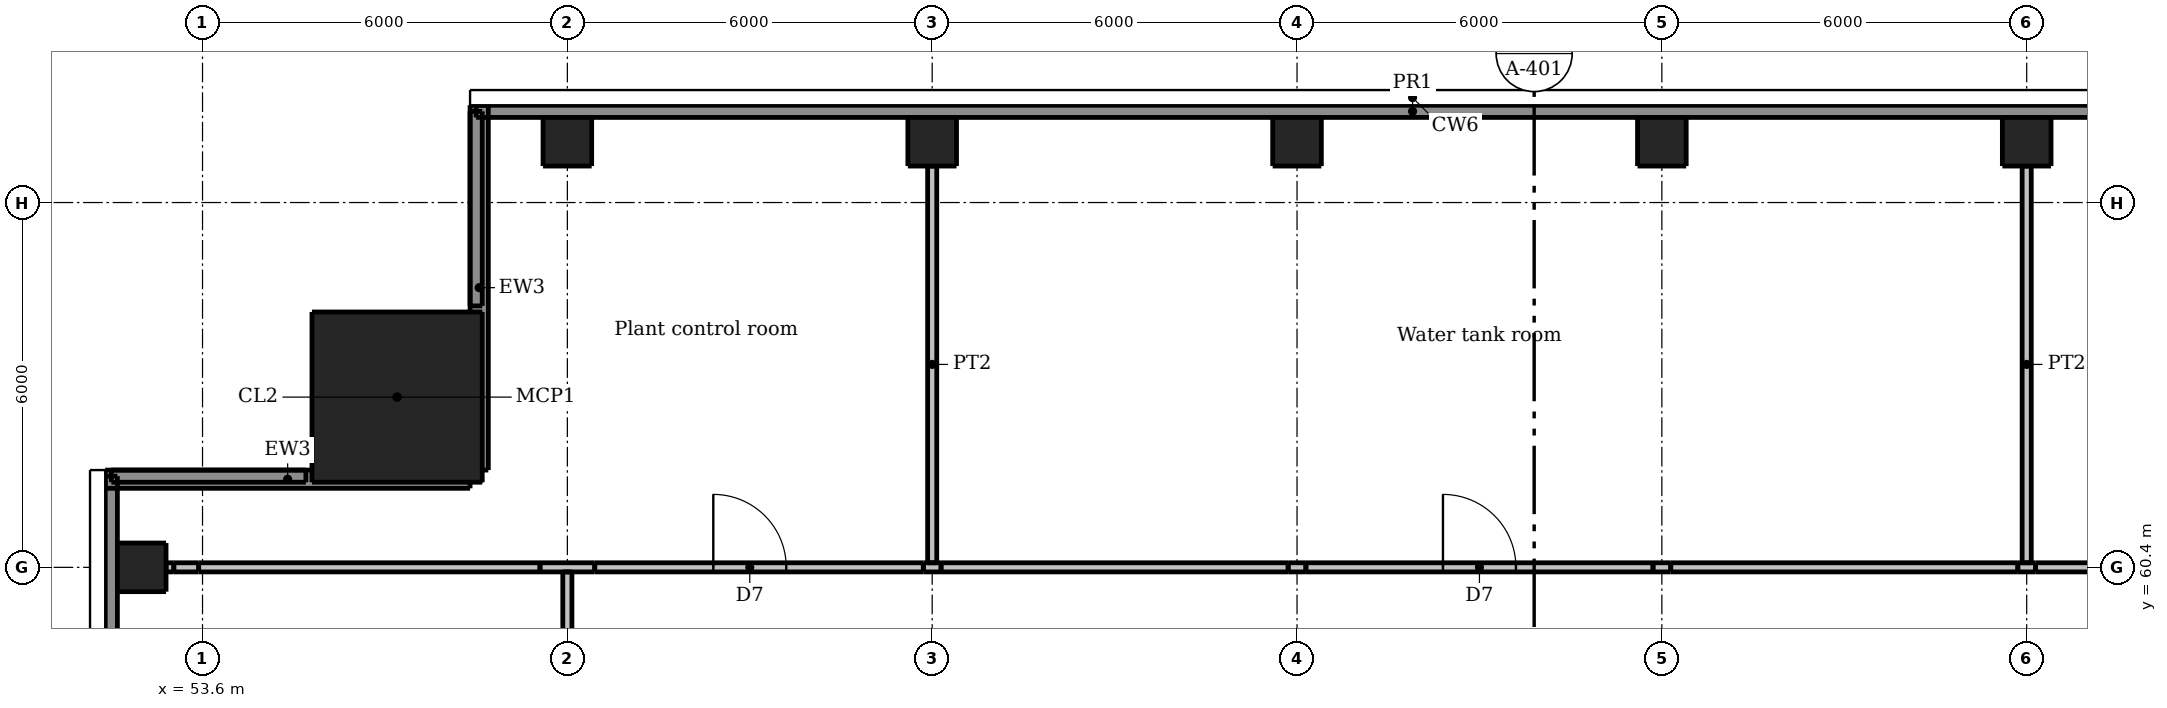
"""IFC4 building model, lengths in metres.
Left out: names, types, materials, properties, quantities, classifications, styles, units other than length and angle.
Written with IfcOpenShell. Run it as: python <this file> out.ifc"""

import sys

from ifc_helpers import new_model, si_unit, direction, frame, frame_2d, origin, origin_2d, place, context, subcontext, project, spatial, rectangle, extrude, element, fill, save


model = new_model("IFC4")
c1 = context("Model", 3, precision=1e-05, world=origin(), true_north=direction((0.0, 1.0)))
c2 = subcontext(c1, "Body", "Model", "MODEL_VIEW")
j1 = project(units=[si_unit("LENGTHUNIT", "METRE"), si_unit("PLANEANGLEUNIT", "RADIAN")], contexts=[c1])
p1 = place(None, origin())
s1 = spatial("IfcSite", under=j1, at=p1, CompositionType="ELEMENT")
p2 = place(p1, origin())
s2 = spatial("IfcBuilding", under=s1, at=p2, CompositionType="ELEMENT")
p3 = place(p2, frame((0.0, 0.0, 286.3)))
s3 = spatial("IfcBuildingStorey", under=s2, at=p3, CompositionType="ELEMENT", Elevation=286.3)
for number, where, z_axis, x_axis in (
    (1, (59.6, 67.4, 0.0), (0.0, 0.0, 1.0), (1.0, 0.0, 0.0)),
    (2, (65.6, 67.4, 0.0), (0.0, 0.0, 1.0), (1.0, 0.0, 0.0)),
    (3, (71.6, 67.4, 0.0), (0.0, 0.0, 1.0), (1.0, 0.0, 0.0)),
    (4, (77.6, 67.4, 0.0), (0.0, 0.0, 1.0), (1.0, 0.0, 0.0)),
    (5, (83.6, 67.4, 0.0), (0.0, 0.0, 1.0), (1.0, 0.0, 0.0)),
    (6, (52.6, 60.4, 0.0), (0.0, 0.0, 1.0), (1.0, 0.0, 0.0)),
):
    element("IfcColumn", number, at=place(p3, frame(where, z_axis=z_axis, x_axis=x_axis)), inside=s3, PredefinedType="COLUMN", context=c2, shape_type="SweptSolid", body=[
        extrude(rectangle(XDim=0.8, YDim=0.8, at=origin_2d()), origin(), (0.0, 0.0, 1.0), 4.2),
    ])
p4 = place(p3, frame((56.8, 63.2, 0.0), z_axis=(0.0, 0.0, 1.0), x_axis=(1.0, 0.0, 0.0)))
e7 = element("IfcColumn", 7, at=p4, inside=s3, PredefinedType="COLUMN", context=c2, shape_type="SweptSolid", body=[
    extrude(rectangle(XDim=2.8, YDim=2.8, at=origin_2d()), origin(), (0.0, 0.0, 1.0), 4.5),
])
for number, where, z_axis, x_axis in (
    (8, (58.15, 68.0, 0.0), (0.0, 0.0, 1.0), (0.0, -1.0, 0.0)),
    (9, (58.0, 61.85, 0.0), (0.0, 0.0, 1.0), (-1.0, 0.0, 0.0)),
):
    element("IfcWall", number, at=place(p3, frame(where, z_axis=z_axis, x_axis=x_axis)), inside=s3, PredefinedType="SOLIDWALL", context=c2, shape_type="SweptSolid", body=[
        extrude(rectangle(XDim=6.0, YDim=0.3, at=frame_2d((3.0, 0.0))), origin(), (0.0, 0.0, 1.0), 4.2),
    ])
p5 = place(p3, frame((52.1, 31.1, 4.5), z_axis=(0.0, 0.0, 1.0), x_axis=(0.0, 1.0, 0.0)))
e10 = element("IfcWall", 10, at=p5, inside=s3, PredefinedType="PARAPET", context=c2, shape_type="SweptSolid", body=[
    extrude(rectangle(XDim=30.8, YDim=0.2, at=frame_2d((15.4, 0.0))), origin(), (0.0, 0.0, 1.0), 1.1),
])
for number, where, z_axis, x_axis in (
    (11, (52.1, 61.9, 4.5), (0.0, 0.0, 1.0), (1.0, 0.0, 0.0)),
    (12, (58.1, 64.7, 4.5), (0.0, 0.0, 1.0), (0.0, 1.0, 0.0)),
):
    element("IfcWall", number, at=place(p3, frame(where, z_axis=z_axis, x_axis=x_axis)), inside=s3, PredefinedType="PARAPET", context=c2, shape_type="SweptSolid", body=[
        extrude(rectangle(XDim=3.2, YDim=0.2, at=frame_2d((1.6, 0.0))), origin(), (0.0, 0.0, 1.0), 1.1),
    ])
p6 = place(p3, frame((58.1, 67.9, 4.5), z_axis=(0.0, 0.0, 1.0), x_axis=(1.0, 0.0, 0.0)))
e13 = element("IfcWall", 13, at=p6, inside=s3, PredefinedType="PARAPET", context=c2, shape_type="SweptSolid", body=[
    extrude(rectangle(XDim=30.8, YDim=0.2, at=frame_2d((15.4, 0.0))), origin(), (0.0, 0.0, 1.0), 1.1),
])
p7 = place(p3, frame((53.0, 60.4, 0.0), z_axis=(0.0, 0.0, 1.0), x_axis=(1.0, 0.0, 0.0)))
e14 = element("IfcWall", 14, at=p7, inside=s3, PredefinedType="PARTITIONING", context=c2, shape_type="SweptSolid", body=[
    extrude(rectangle(XDim=0.128, YDim=0.15, at=frame_2d((0.064, 0.0))), origin(), (0.0, 0.0, 1.0), 3.365),
])
p8 = place(p3, frame((53.128, 60.4, 0.0), z_axis=(0.0, 0.0, 1.0), x_axis=(1.0, 0.0, 0.0)))
e15 = element("IfcWall", 15, at=p8, inside=s3, PredefinedType="PARTITIONING", context=c2, shape_type="SweptSolid", body=[
    extrude(rectangle(XDim=0.409, YDim=0.15, at=frame_2d((0.205, 0.0))), origin(), (0.0, 0.0, 1.0), 3.286),
])
p9 = place(p3, frame((53.537, 60.4, 0.0), z_axis=(0.0, 0.0, 1.0), x_axis=(1.0, 0.0, 0.0)))
e16 = element("IfcWall", 16, at=p9, inside=s3, PredefinedType="PARTITIONING", context=c2, shape_type="SweptSolid", body=[
    extrude(rectangle(XDim=5.613, YDim=0.15, at=frame_2d((2.807, 0.0))), origin(), (0.0, 0.0, 1.0), 3.365),
])
p10 = place(p3, frame((59.15, 60.4, 0.0), z_axis=(0.0, 0.0, 1.0), x_axis=(1.0, 0.0, 0.0)))
e17 = element("IfcWall", 17, at=p10, inside=s3, PredefinedType="PARTITIONING", context=c2, shape_type="SweptSolid", body=[
    extrude(rectangle(XDim=0.9, YDim=0.15, at=frame_2d((0.45, 0.0))), origin(), (0.0, 0.0, 1.0), 2.897),
])
p11 = place(p3, frame((60.05, 60.4, 0.0), z_axis=(0.0, 0.0, 1.0), x_axis=(1.0, 0.0, 0.0)))
e18 = element("IfcWall", 18, at=p11, inside=s3, PredefinedType="PARTITIONING", context=c2, shape_type="SweptSolid", body=[
    extrude(rectangle(XDim=5.404, YDim=0.15, at=frame_2d((2.702, 0.0))), origin(), (0.0, 0.0, 1.0), 4.2),
])
p12 = place(p11, frame((1.95, 0.0, 0.0)))
e19 = element("IfcOpeningElement", 19, at=p12, cuts=e18, PredefinedType="OPENING", context=c2, shape_type="SweptSolid", body=[
    extrude(rectangle(XDim=1.2, YDim=2.1, at=frame_2d((0.6, 1.05))), frame((0.0, 0.085, 0.0), z_axis=(0.0, -1.0, 0.0), x_axis=(1.0, 0.0, 0.0)), (0.0, 0.0, 1.0), 0.17),
])
p13 = place(p3, frame((65.454, 60.4, 0.0), z_axis=(0.0, 0.0, 1.0), x_axis=(1.0, 0.0, 0.0)))
e20 = element("IfcWall", 20, at=p13, inside=s3, PredefinedType="PARTITIONING", context=c2, shape_type="SweptSolid", body=[
    extrude(rectangle(XDim=0.292, YDim=0.15, at=frame_2d((0.146, 0.0))), origin(), (0.0, 0.0, 1.0), 3.365),
])
p14 = place(p3, frame((65.746, 60.4, 0.0), z_axis=(0.0, 0.0, 1.0), x_axis=(1.0, 0.0, 0.0)))
e21 = element("IfcWall", 21, at=p14, inside=s3, PredefinedType="PARTITIONING", context=c2, shape_type="SweptSolid", body=[
    extrude(rectangle(XDim=5.708, YDim=0.15, at=frame_2d((2.854, 0.0))), origin(), (0.0, 0.0, 1.0), 4.2),
])
p15 = place(p3, frame((71.454, 60.4, 0.0), z_axis=(0.0, 0.0, 1.0), x_axis=(1.0, 0.0, 0.0)))
e22 = element("IfcWall", 22, at=p15, inside=s3, PredefinedType="PARTITIONING", context=c2, shape_type="SweptSolid", body=[
    extrude(rectangle(XDim=0.292, YDim=0.15, at=frame_2d((0.146, 0.0))), origin(), (0.0, 0.0, 1.0), 3.365),
])
p16 = place(p3, frame((71.746, 60.4, 0.0), z_axis=(0.0, 0.0, 1.0), x_axis=(1.0, 0.0, 0.0)))
e23 = element("IfcWall", 23, at=p16, inside=s3, PredefinedType="PARTITIONING", context=c2, shape_type="SweptSolid", body=[
    extrude(rectangle(XDim=5.708, YDim=0.15, at=frame_2d((2.854, 0.0))), origin(), (0.0, 0.0, 1.0), 4.2),
])
p17 = place(p16, frame((2.254, 0.0, 0.0)))
e24 = element("IfcOpeningElement", 24, at=p17, cuts=e23, PredefinedType="OPENING", context=c2, shape_type="SweptSolid", body=[
    extrude(rectangle(XDim=1.2, YDim=2.1, at=frame_2d((0.6, 1.05))), frame((0.0, 0.085, 0.0), z_axis=(0.0, -1.0, 0.0), x_axis=(1.0, 0.0, 0.0)), (0.0, 0.0, 1.0), 0.17),
])
p18 = place(p3, frame((77.454, 60.4, 0.0), z_axis=(0.0, 0.0, 1.0), x_axis=(1.0, 0.0, 0.0)))
e25 = element("IfcWall", 25, at=p18, inside=s3, PredefinedType="PARTITIONING", context=c2, shape_type="SweptSolid", body=[
    extrude(rectangle(XDim=0.292, YDim=0.15, at=frame_2d((0.146, 0.0))), origin(), (0.0, 0.0, 1.0), 3.365),
])
p19 = place(p3, frame((77.746, 60.4, 0.0), z_axis=(0.0, 0.0, 1.0), x_axis=(1.0, 0.0, 0.0)))
e26 = element("IfcWall", 26, at=p19, inside=s3, PredefinedType="PARTITIONING", context=c2, shape_type="SweptSolid", body=[
    extrude(rectangle(XDim=5.708, YDim=0.15, at=frame_2d((2.854, 0.0))), origin(), (0.0, 0.0, 1.0), 4.2),
])
p20 = place(p3, frame((83.454, 60.4, 0.0), z_axis=(0.0, 0.0, 1.0), x_axis=(1.0, 0.0, 0.0)))
e27 = element("IfcWall", 27, at=p20, inside=s3, PredefinedType="PARTITIONING", context=c2, shape_type="SweptSolid", body=[
    extrude(rectangle(XDim=0.292, YDim=0.15, at=frame_2d((0.146, 0.0))), origin(), (0.0, 0.0, 1.0), 3.365),
])
p21 = place(p3, frame((83.746, 60.4, 0.0), z_axis=(0.0, 0.0, 1.0), x_axis=(1.0, 0.0, 0.0)))
e28 = element("IfcWall", 28, at=p21, inside=s3, PredefinedType="PARTITIONING", context=c2, shape_type="SweptSolid", body=[
    extrude(rectangle(XDim=4.404, YDim=0.15, at=frame_2d((2.202, 0.0))), origin(), (0.0, 0.0, 1.0), 4.2),
])
p22 = place(p21, frame((2.254, 0.0, 0.0)))
e29 = element("IfcOpeningElement", 29, at=p22, cuts=e28, PredefinedType="OPENING", context=c2, shape_type="SweptSolid", body=[
    extrude(rectangle(XDim=1.2, YDim=2.1, at=frame_2d((0.6, 1.05))), frame((0.0, 0.085, 0.0), z_axis=(0.0, -1.0, 0.0), x_axis=(1.0, 0.0, 0.0)), (0.0, 0.0, 1.0), 0.17),
])
p23 = place(p3, frame((59.6, 54.546, 0.0), z_axis=(0.0, 0.0, 1.0), x_axis=(0.0, 1.0, 0.0)))
e30 = element("IfcWall", 30, at=p23, inside=s3, PredefinedType="PARTITIONING", context=c2, shape_type="SweptSolid", body=[
    extrude(rectangle(XDim=5.779, YDim=0.15, at=frame_2d((2.89, 0.0))), origin(), (0.0, 0.0, 1.0), 2.897),
])
for number, where, z_axis, x_axis in (
    (31, (65.6, 60.475, 0.0), (0.0, 0.0, 1.0), (0.0, 1.0, 0.0)),
    (32, (83.6, 60.475, 0.0), (0.0, 0.0, 1.0), (0.0, 1.0, 0.0)),
):
    element("IfcWall", number, at=place(p3, frame(where, z_axis=z_axis, x_axis=x_axis)), inside=s3, PredefinedType="PARTITIONING", context=c2, shape_type="SweptSolid", body=[
        extrude(rectangle(XDim=6.525, YDim=0.15, at=frame_2d((3.262, 0.0))), origin(), (0.0, 0.0, 1.0), 3.365),
    ])
p24 = place(p12, origin())
e33 = element("IfcDoor", 33, at=p24, inside=s3, OperationType="SINGLE_SWING_LEFT", PredefinedType="DOOR", context=c2, shape_type="SweptSolid", body=[
    extrude(rectangle(XDim=1.2, YDim=2.1, at=frame_2d((0.6, 1.05))), frame((0.0, 0.025, 0.0), z_axis=(0.0, -1.0, 0.0), x_axis=(1.0, 0.0, 0.0)), (0.0, 0.0, 1.0), 0.05),
])
fill(e19, e33)
p25 = place(p17, origin())
e34 = element("IfcDoor", 34, at=p25, inside=s3, OperationType="SINGLE_SWING_LEFT", PredefinedType="DOOR", context=c2, shape_type="SweptSolid", body=[
    extrude(rectangle(XDim=1.2, YDim=2.1, at=frame_2d((0.6, 1.05))), frame((0.0, 0.025, 0.0), z_axis=(0.0, -1.0, 0.0), x_axis=(1.0, 0.0, 0.0)), (0.0, 0.0, 1.0), 0.05),
])
fill(e24, e34)
save(model, sys.argv[1])
